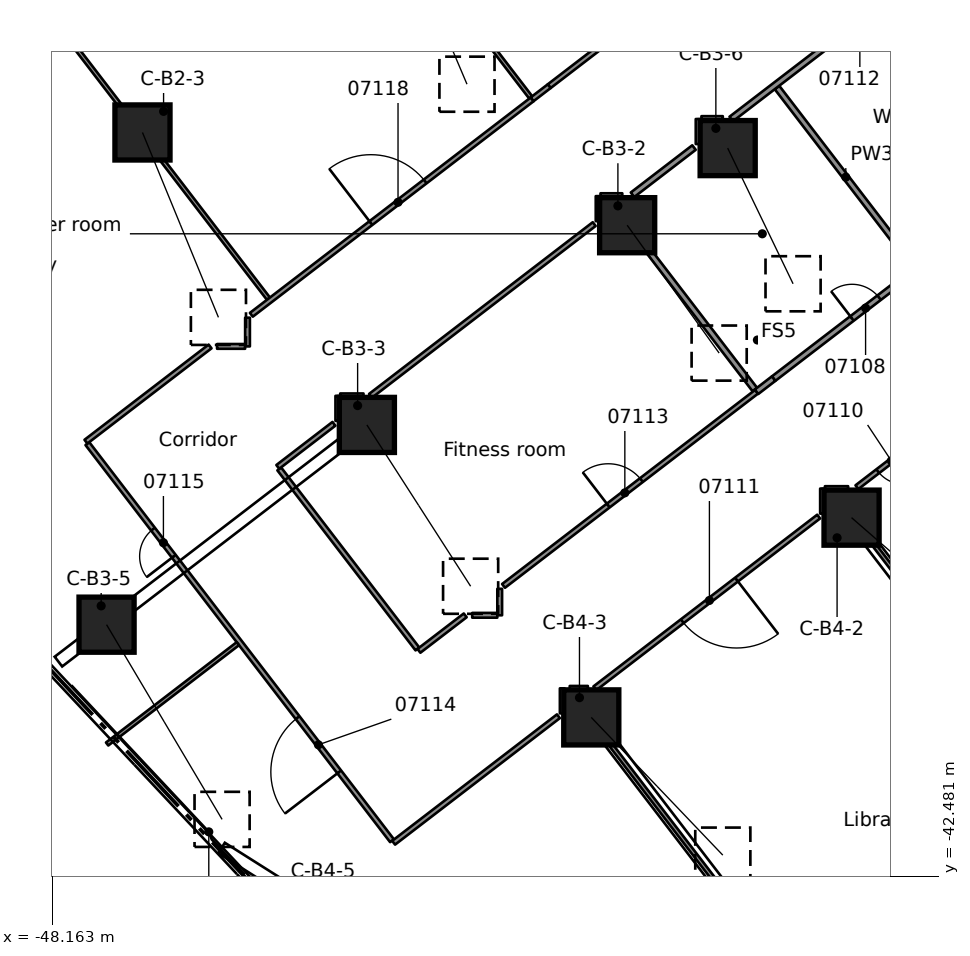
"""IFC4 building model, lengths in metres.
Left out: names, types, materials, properties, quantities, classifications, styles, units other than length and angle.
Written with IfcOpenShell. Run it as: python <this file> out.ifc"""

import sys

from ifc_helpers import new_model, si_unit, direction, frame, frame_2d, origin, origin_2d, place, context, subcontext, project, spatial, rectangle, extrude, element, fill, save


model = new_model("IFC4")
c1 = context("Model", 3, precision=1e-05, world=origin(), true_north=direction((0.0, 1.0)))
c2 = subcontext(c1, "Body", "Model", "MODEL_VIEW")
j1 = project(units=[si_unit("LENGTHUNIT", "METRE"), si_unit("PLANEANGLEUNIT", "RADIAN")], contexts=[c1])
p1 = place(None, origin())
s1 = spatial("IfcSite", under=j1, at=p1, CompositionType="ELEMENT")
p2 = place(p1, origin())
s2 = spatial("IfcBuilding", under=s1, at=p2, CompositionType="ELEMENT")
p3 = place(p2, frame((0.0, 0.0, 33.3)))
s3 = spatial("IfcBuildingStorey", under=s2, at=p3, CompositionType="ELEMENT", Elevation=33.3)
p4 = place(p3, frame((-38.935, -17.649, 0.61), z_axis=(0.328456976926, -0.774735201136, 0.540278985737), x_axis=(0.920675138709, 0.390329718267, 0.0)))
e1 = element("IfcColumn", 1, at=p4, inside=s3, PredefinedType="COLUMN", context=c2, shape_type="SweptSolid", body=[
    extrude(rectangle(XDim=1.45, YDim=1.45, at=origin_2d()), origin(), (0.0, 0.0, 1.0), 5.145),
])
p5 = place(p3, frame((-45.784, -22.905, 0.644), z_axis=(0.337825549268, -0.822160444585, 0.45817693266), x_axis=(0.924959508437, 0.380065662422, 0.0)))
e2 = element("IfcColumn", 2, at=p5, inside=s3, PredefinedType="COLUMN", context=c2, shape_type="SweptSolid", body=[
    extrude(rectangle(XDim=1.45, YDim=1.45, at=origin_2d()), origin(), (0.0, 0.0, 1.0), 5.917),
])
p6 = place(p3, frame((-33.03, -25.345, 0.601), z_axis=(0.484075605361, -0.672785526742, 0.559491236125), x_axis=(0.811723079597, 0.584042500208, 0.0)))
e3 = element("IfcColumn", 3, at=p6, inside=s3, PredefinedType="COLUMN", context=c2, shape_type="SweptSolid", body=[
    extrude(rectangle(XDim=1.45, YDim=1.45, at=origin_2d()), origin(), (0.0, 0.0, 1.0), 5.001),
])
p7 = place(p3, frame((-39.879, -30.6, 0.638), z_axis=(0.476003991751, -0.740143212715, 0.474982341259), x_axis=(0.841076298964, 0.540916499397, 0.0)))
e4 = element("IfcColumn", 4, at=p7, inside=s3, PredefinedType="COLUMN", context=c2, shape_type="SweptSolid", body=[
    extrude(rectangle(XDim=1.45, YDim=1.45, at=origin_2d()), origin(), (0.0, 0.0, 1.0), 5.735),
])
p8 = place(p3, frame((-46.729, -35.856, 0.661), z_axis=(0.465465031922, -0.78439754496, 0.409954626171), x_axis=(0.859985150882, 0.510319057319, 0.0)))
e5 = element("IfcColumn", 5, at=p8, inside=s3, PredefinedType="COLUMN", context=c2, shape_type="SweptSolid", body=[
    extrude(rectangle(XDim=1.45, YDim=1.45, at=origin_2d()), origin(), (0.0, 0.0, 1.0), 6.531),
])
p9 = place(p3, frame((-30.385, -23.316, 0.591), z_axis=(0.353875242444, -0.734106635021, 0.579534089768), x_axis=(0.90080181457, 0.434230458244, 0.0)))
e6 = element("IfcColumn", 6, at=p9, inside=s3, PredefinedType="COLUMN", context=c2, shape_type="SweptSolid", body=[
    extrude(rectangle(XDim=1.45, YDim=1.45, at=origin_2d()), origin(), (0.0, 0.0, 1.0), 4.863),
])
p10 = place(p3, frame((-27.125, -33.04, 0.603), z_axis=(0.626915434331, -0.545922874152, 0.555828439066), x_axis=(0.656712169931, 0.754141316906, 0.0)))
e7 = element("IfcColumn", 7, at=p10, inside=s3, PredefinedType="COLUMN", context=c2, shape_type="SweptSolid", body=[
    extrude(rectangle(XDim=1.45, YDim=1.45, at=origin_2d()), origin(), (0.0, 0.0, 1.0), 5.028),
])
p11 = place(p3, frame((-33.974, -38.296, 0.637), z_axis=(0.606713355896, -0.635258027433, 0.477855775689), x_axis=(0.723167492828, 0.690672699125, 0.0)))
e8 = element("IfcColumn", 8, at=p11, inside=s3, PredefinedType="COLUMN", context=c2, shape_type="SweptSolid", body=[
    extrude(rectangle(XDim=1.45, YDim=1.45, at=origin_2d()), origin(), (0.0, 0.0, 1.0), 5.705),
])
p12 = place(p3, frame((-39.218, -41.54, 0.0), z_axis=(0.0, 0.0, 1.0), x_axis=(-0.608705901591, 0.79339594489, 0.0)))
e9 = element("IfcWall", 9, at=p12, inside=s3, PredefinedType="PARTITIONING", context=c2, shape_type="SweptSolid", body=[
    extrude(rectangle(XDim=13.169, YDim=0.125, at=frame_2d((6.584, 0.0))), origin(), (0.0, 0.0, 1.0), 3.56),
])
p13 = place(p12, frame((2.281, 0.0, 0.0)))
e10 = element("IfcOpeningElement", 10, at=p13, cuts=e9, PredefinedType="OPENING", context=c2, shape_type="SweptSolid", body=[
    extrude(rectangle(XDim=1.8, YDim=2.1, at=frame_2d((0.9, 1.05))), frame((0.0, 0.073, 0.0), z_axis=(0.0, -1.0, 0.0), x_axis=(1.0, 0.0, 0.0)), (0.0, 0.0, 1.0), 0.145),
])
p14 = place(p12, frame((9.431, 0.0, 0.0)))
e11 = element("IfcOpeningElement", 11, at=p14, cuts=e9, PredefinedType="OPENING", context=c2, shape_type="SweptSolid", body=[
    extrude(rectangle(XDim=0.9, YDim=2.1, at=frame_2d((0.45, 1.05))), frame((0.0, 0.073, 0.0), z_axis=(0.0, -1.0, 0.0), x_axis=(1.0, 0.0, 0.0)), (0.0, 0.0, 1.0), 0.145),
])
p15 = place(p3, frame((-42.185, -31.757, 0.0), z_axis=(0.0, 0.0, 1.0), x_axis=(0.608799639809, -0.793324018651, 0.0)))
e12 = element("IfcWall", 12, at=p15, inside=s3, PredefinedType="PARTITIONING", context=c2, shape_type="SweptSolid", body=[
    extrude(rectangle(XDim=5.972, YDim=0.125, at=frame_2d((2.986, 0.0))), origin(), (0.0, 0.0, 1.0), 3.56),
])
p16 = place(p3, frame((-52.2, -14.599, 0.0), z_axis=(0.0, 0.0, 1.0), x_axis=(0.608803805545, -0.793320821833, 0.0)))
e13 = element("IfcWall", 13, at=p16, inside=s3, PredefinedType="PARTITIONING", context=c2, shape_type="SweptSolid", body=[
    extrude(rectangle(XDim=15.982, YDim=0.1, at=frame_2d((7.991, 0.0))), origin(), (0.0, 0.0, 1.0), 3.56),
])
p17 = place(p3, frame((-34.501, -37.664, 0.0), z_axis=(0.0, 0.0, 1.0), x_axis=(0.608768597096, -0.793347839973, 0.0)))
e14 = element("IfcWall", 14, at=p17, inside=s3, PredefinedType="PARTITIONING", context=c2, shape_type="SweptSolid", body=[
    extrude(rectangle(XDim=16.162, YDim=0.1, at=frame_2d((8.081, 0.0))), origin(), (0.0, 0.0, 1.0), 3.56),
])
p18 = place(p3, frame((-45.331, -9.259, 0.0), z_axis=(0.0, 0.0, 1.0), x_axis=(0.608773776811, -0.793343865337, 0.0)))
e15 = element("IfcWall", 15, at=p18, inside=s3, PredefinedType="PARTITIONING", context=c2, shape_type="SweptSolid", body=[
    extrude(rectangle(XDim=16.037, YDim=0.1, at=frame_2d((8.019, 0.0))), origin(), (0.0, 0.0, 1.0), 3.56),
])
p19 = place(p3, frame((-33.482, -24.701, 0.0), z_axis=(0.0, 0.0, 1.0), x_axis=(0.608730316576, -0.793377212731, 0.0)))
e16 = element("IfcWall", 16, at=p19, inside=s3, PredefinedType="PARTITIONING", context=c2, shape_type="SweptSolid", body=[
    extrude(rectangle(XDim=6.261, YDim=0.15, at=frame_2d((3.13, 0.0))), origin(), (0.0, 0.0, 1.0), 3.56),
])
p20 = place(p3, frame((-27.599, -32.368, 0.0), z_axis=(0.0, 0.0, 1.0), x_axis=(0.608787633684, -0.793333232049, 0.0)))
e17 = element("IfcWall", 17, at=p20, inside=s3, PredefinedType="PARTITIONING", context=c2, shape_type="SweptSolid", body=[
    extrude(rectangle(XDim=15.6, YDim=0.1, at=frame_2d((7.8, 0.0))), origin(), (0.0, 0.0, 1.0), 3.56),
])
p21 = place(p3, frame((-29.087, -21.722, 0.0), z_axis=(0.0, 0.0, 1.0), x_axis=(0.608744291625, -0.793366489975, 0.0)))
e18 = element("IfcWall", 18, at=p21, inside=s3, PredefinedType="PARTITIONING", context=c2, shape_type="SweptSolid", body=[
    extrude(rectangle(XDim=5.948, YDim=0.15, at=frame_2d((2.974, 0.0))), origin(), (0.0, 0.0, 1.0), 3.56),
])
p22 = place(p3, frame((-34.541, -37.531, 0.0), z_axis=(0.0, 0.0, 1.0), x_axis=(1.0, 0.0, 0.0)))
e19 = element("IfcWall", 19, at=p22, inside=s3, PredefinedType="PARTITIONING", context=c2, shape_type="SweptSolid", body=[
    extrude(rectangle(XDim=0.477, YDim=0.125, at=frame_2d((0.239, 0.0))), origin(), (0.0, 0.0, 1.0), 3.56),
])
p23 = place(p3, frame((-37.107, -35.609, 0.0), z_axis=(0.0, 0.0, 1.0), x_axis=(1.0, 0.0, 0.0)))
e20 = element("IfcWall", 20, at=p23, inside=s3, PredefinedType="PARTITIONING", context=c2, shape_type="SweptSolid", body=[
    extrude(rectangle(XDim=0.66, YDim=0.125, at=frame_2d((0.33, 0.0))), origin(), (0.0, 0.0, 1.0), 3.56),
])
p24 = place(p3, frame((-27.826, -32.275, 0.0), z_axis=(0.0, 0.0, 1.0), x_axis=(1.0, 0.0, 0.0)))
e21 = element("IfcWall", 21, at=p24, inside=s3, PredefinedType="PARTITIONING", context=c2, shape_type="SweptSolid", body=[
    extrude(rectangle(XDim=0.611, YDim=0.125, at=frame_2d((0.305, 0.0))), origin(), (0.0, 0.0, 1.0), 3.56),
])
p25 = place(p3, frame((-40.581, -29.835, 0.0), z_axis=(0.0, 0.0, 1.0), x_axis=(1.0, 0.0, 0.0)))
e22 = element("IfcWall", 22, at=p25, inside=s3, PredefinedType="PARTITIONING", context=c2, shape_type="SweptSolid", body=[
    extrude(rectangle(XDim=0.613, YDim=0.125, at=frame_2d((0.307, 0.0))), origin(), (0.0, 0.0, 1.0), 3.56),
])
p26 = place(p3, frame((-43.821, -28.534, 0.0), z_axis=(0.0, 0.0, 1.0), x_axis=(1.0, 0.0, 0.0)))
e23 = element("IfcWall", 23, at=p26, inside=s3, PredefinedType="PARTITIONING", context=c2, shape_type="SweptSolid", body=[
    extrude(rectangle(XDim=0.738, YDim=0.125, at=frame_2d((0.369, 0.0))), origin(), (0.0, 0.0, 1.0), 3.56),
])
p27 = place(p3, frame((-33.731, -24.58, 0.0), z_axis=(0.0, 0.0, 1.0), x_axis=(1.0, 0.0, 0.0)))
e24 = element("IfcWall", 24, at=p27, inside=s3, PredefinedType="PARTITIONING", context=c2, shape_type="SweptSolid", body=[
    extrude(rectangle(XDim=0.573, YDim=0.15, at=frame_2d((0.287, 0.0))), origin(), (0.0, 0.0, 1.0), 3.56),
])
p28 = place(p3, frame((-31.075, -22.551, 0.0), z_axis=(0.0, 0.0, 1.0), x_axis=(1.0, 0.0, 0.0)))
e25 = element("IfcWall", 25, at=p28, inside=s3, PredefinedType="PARTITIONING", context=c2, shape_type="SweptSolid", body=[
    extrude(rectangle(XDim=0.562, YDim=0.15, at=frame_2d((0.281, 0.0))), origin(), (0.0, 0.0, 1.0), 3.56),
])
p29 = place(p3, frame((-39.175, -41.594, 0.0), z_axis=(0.0, 0.0, 1.0), x_axis=(0.793282735045, 0.608853432511, 0.0)))
e26 = element("IfcWall", 26, at=p29, inside=s3, PredefinedType="PARTITIONING", context=c2, shape_type="SweptSolid", body=[
    extrude(rectangle(XDim=5.466, YDim=0.125, at=frame_2d((2.733, 0.0))), origin(), (0.0, 0.0, 1.0), 3.56),
])
p30 = place(p3, frame((-27.991, -33.012, 0.0), z_axis=(0.0, 0.0, 1.0), x_axis=(-0.793332599064, -0.608788458549, 0.0)))
e27 = element("IfcWall", 27, at=p30, inside=s3, PredefinedType="PARTITIONING", context=c2, shape_type="SweptSolid", body=[
    extrude(rectangle(XDim=7.423, YDim=0.125, at=frame_2d((3.711, 0.0))), origin(), (0.0, 0.0, 1.0), 3.56),
])
p31 = place(p30, frame((2.723, 0.0, 0.0)))
e28 = element("IfcOpeningElement", 28, at=p31, cuts=e27, PredefinedType="OPENING", context=c2, shape_type="SweptSolid", body=[
    extrude(rectangle(XDim=1.8, YDim=2.1, at=frame_2d((0.9, 1.05))), frame((0.0, 0.073, 0.0), z_axis=(0.0, -1.0, 0.0), x_axis=(1.0, 0.0, 0.0)), (0.0, 0.0, 1.0), 0.145),
])
p32 = place(p3, frame((-25.346, -30.982, 0.0), z_axis=(0.0, 0.0, 1.0), x_axis=(-0.79329604463, -0.608836090893, 0.0)))
e29 = element("IfcWall", 29, at=p32, inside=s3, PredefinedType="PARTITIONING", context=c2, shape_type="SweptSolid", body=[
    extrude(rectangle(XDim=2.065, YDim=0.125, at=frame_2d((1.032, 0.0))), origin(), (0.0, 0.0, 1.0), 3.56),
])
p33 = place(p32, frame((0.473, 0.0, 0.0)))
e30 = element("IfcOpeningElement", 30, at=p33, cuts=e29, PredefinedType="OPENING", context=c2, shape_type="SweptSolid", body=[
    extrude(rectangle(XDim=0.9, YDim=2.1, at=frame_2d((0.45, 1.05))), frame((0.0, 0.073, 0.0), z_axis=(0.0, -1.0, 0.0), x_axis=(1.0, 0.0, 0.0)), (0.0, 0.0, 1.0), 0.145),
])
p34 = place(p3, frame((-38.509, -36.545, 0.0), z_axis=(0.0, 0.0, 1.0), x_axis=(0.793598680467, 0.608441561994, 0.0)))
e31 = element("IfcWall", 31, at=p34, inside=s3, PredefinedType="PARTITIONING", context=c2, shape_type="SweptSolid", body=[
    extrude(rectangle(XDim=1.535, YDim=0.125, at=frame_2d((0.768, 0.0))), origin(), (0.0, 0.0, 1.0), 3.56),
])
p35 = place(p3, frame((-36.283, -34.836, 0.0), z_axis=(0.0, 0.0, 1.0), x_axis=(0.793406369961, 0.608692313165, 0.0)))
e32 = element("IfcWall", 32, at=p35, inside=s3, PredefinedType="PARTITIONING", context=c2, shape_type="SweptSolid", body=[
    extrude(rectangle(XDim=8.392, YDim=0.125, at=frame_2d((4.196, 0.0))), origin(), (0.0, 0.0, 1.0), 3.56),
])
p36 = place(p35, frame((3.473, 0.0, 0.0)))
e33 = element("IfcOpeningElement", 33, at=p36, cuts=e32, PredefinedType="OPENING", context=c2, shape_type="SweptSolid", body=[
    extrude(rectangle(XDim=1.1, YDim=2.1, at=frame_2d((0.55, 1.05))), frame((0.0, 0.073, 0.0), z_axis=(0.0, -1.0, 0.0), x_axis=(1.0, 0.0, 0.0)), (0.0, 0.0, 1.0), 0.145),
])
p37 = place(p3, frame((-29.176, -29.382, 0.0), z_axis=(0.0, 0.0, 1.0), x_axis=(0.793471421385, 0.608607511821, 0.0)))
e34 = element("IfcWall", 34, at=p37, inside=s3, PredefinedType="PARTITIONING", context=c2, shape_type="SweptSolid", body=[
    extrude(rectangle(XDim=9.32, YDim=0.15, at=frame_2d((4.66, 0.0))), origin(), (0.0, 0.0, 1.0), 3.56),
])
p38 = place(p37, frame((2.6, 0.0, 0.0)))
e35 = element("IfcOpeningElement", 35, at=p38, cuts=e34, PredefinedType="OPENING", context=c2, shape_type="SweptSolid", body=[
    extrude(rectangle(XDim=0.9, YDim=2.1, at=frame_2d((0.45, 1.05))), frame((0.0, 0.085, 0.0), z_axis=(0.0, -1.0, 0.0), x_axis=(1.0, 0.0, 0.0)), (0.0, 0.0, 1.0), 0.17),
])
p39 = place(p3, frame((-29.625, -29.727, 0.0), z_axis=(0.0, 0.0, 1.0), x_axis=(0.792960485916, 0.609273065035, 0.0)))
e36 = element("IfcWall", 36, at=p39, inside=s3, PredefinedType="PARTITIONING", context=c2, shape_type="SweptSolid", body=[
    extrude(rectangle(XDim=0.566, YDim=0.15, at=frame_2d((0.283, 0.0))), origin(), (0.0, 0.0, 1.0), 3.56),
])
p40 = place(p3, frame((-46.714, -38.996, 0.0), z_axis=(0.0, 0.0, 1.0), x_axis=(0.793309958448, 0.608817961157, 0.0)))
e37 = element("IfcWall", 37, at=p40, inside=s3, PredefinedType="PARTITIONING", context=c2, shape_type="SweptSolid", body=[
    extrude(rectangle(XDim=4.336, YDim=0.1, at=frame_2d((2.168, 0.0))), origin(), (0.0, 0.0, 1.0), 3.56),
])
p41 = place(p3, frame((-42.223, -31.705, 0.0), z_axis=(0.0, 0.0, 1.0), x_axis=(0.793135510501, 0.609045205204, 0.0)))
e38 = element("IfcWall", 38, at=p41, inside=s3, PredefinedType="PARTITIONING", context=c2, shape_type="SweptSolid", body=[
    extrude(rectangle(XDim=1.862, YDim=0.125, at=frame_2d((0.931, 0.0))), origin(), (0.0, 0.0, 1.0), 3.56),
])
p42 = place(p3, frame((-39.784, -29.835, 0.0), z_axis=(0.0, 0.0, 1.0), x_axis=(0.793235050969, 0.608915555652, 0.0)))
e39 = element("IfcWall", 39, at=p42, inside=s3, PredefinedType="PARTITIONING", context=c2, shape_type="SweptSolid", body=[
    extrude(rectangle(XDim=7.421, YDim=0.125, at=frame_2d((3.711, 0.0))), origin(), (0.0, 0.0, 1.0), 3.56),
])
p43 = place(p3, frame((-32.889, -24.544, 0.0), z_axis=(0.0, 0.0, 1.0), x_axis=(0.793242097783, 0.608906375648, 0.0)))
e40 = element("IfcWall", 40, at=p43, inside=s3, PredefinedType="PARTITIONING", context=c2, shape_type="SweptSolid", body=[
    extrude(rectangle(XDim=2.04, YDim=0.15, at=frame_2d((1.02, 0.0))), origin(), (0.0, 0.0, 1.0), 3.56),
])
p44 = place(p3, frame((-24.685, -18.25, 0.0), z_axis=(0.0, 0.0, 1.0), x_axis=(-0.793443961698, -0.608643310687, 0.0)))
e41 = element("IfcWall", 41, at=p44, inside=s3, PredefinedType="PARTITIONING", context=c2, shape_type="SweptSolid", body=[
    extrude(rectangle(XDim=7.067, YDim=0.15, at=frame_2d((3.533, 0.0))), origin(), (0.0, 0.0, 1.0), 3.56),
])
p45 = place(p44, frame((2.35, 0.0, 0.0)))
e42 = element("IfcOpeningElement", 42, at=p45, cuts=e41, PredefinedType="OPENING", context=c2, shape_type="SweptSolid", body=[
    extrude(rectangle(XDim=0.9, YDim=2.1, at=frame_2d((0.45, 1.05))), frame((0.0, 0.085, 0.0), z_axis=(0.0, -1.0, 0.0), x_axis=(1.0, 0.0, 0.0)), (0.0, 0.0, 1.0), 0.17),
])
p46 = place(p3, frame((-44.005, -28.535, 0.0), z_axis=(0.0, 0.0, 1.0), x_axis=(-0.793449826547, -0.608635665035, 0.0)))
e43 = element("IfcWall", 43, at=p46, inside=s3, PredefinedType="PARTITIONING", context=c2, shape_type="SweptSolid", body=[
    extrude(rectangle(XDim=4.118, YDim=0.125, at=frame_2d((2.059, 0.0))), origin(), (0.0, 0.0, 1.0), 3.56),
])
p47 = place(p3, frame((-42.919, -27.702, 0.0), z_axis=(0.0, 0.0, 1.0), x_axis=(0.793470923698, 0.60860816068, 0.0)))
e44 = element("IfcWall", 44, at=p47, inside=s3, PredefinedType="PARTITIONING", context=c2, shape_type="SweptSolid", body=[
    extrude(rectangle(XDim=9.315, YDim=0.125, at=frame_2d((4.657, 0.0))), origin(), (0.0, 0.0, 1.0), 3.56),
])
p48 = place(p47, frame((3.964, 0.0, 0.0)))
e45 = element("IfcOpeningElement", 45, at=p48, cuts=e44, PredefinedType="OPENING", context=c2, shape_type="SweptSolid", body=[
    extrude(rectangle(XDim=1.8, YDim=2.1, at=frame_2d((0.9, 1.05))), frame((0.0, 0.073, 0.0), z_axis=(0.0, -1.0, 0.0), x_axis=(1.0, 0.0, 0.0)), (0.0, 0.0, 1.0), 0.145),
])
p49 = place(p3, frame((-35.081, -21.687, 0.0), z_axis=(0.0, 0.0, 1.0), x_axis=(0.793358624224, 0.608754542792, 0.0)))
e46 = element("IfcWall", 46, at=p49, inside=s3, PredefinedType="PARTITIONING", context=c2, shape_type="SweptSolid", body=[
    extrude(rectangle(XDim=9.567, YDim=0.125, at=frame_2d((4.784, 0.0))), origin(), (0.0, 0.0, 1.0), 3.56),
])
p50 = place(p49, frame((6.334, 0.0, 0.0)))
e47 = element("IfcOpeningElement", 47, at=p50, cuts=e46, PredefinedType="OPENING", context=c2, shape_type="SweptSolid", body=[
    extrude(rectangle(XDim=1.8, YDim=2.1, at=frame_2d((0.9, 1.05))), frame((0.0, 0.073, 0.0), z_axis=(0.0, -1.0, 0.0), x_axis=(1.0, 0.0, 0.0)), (0.0, 0.0, 1.0), 0.145),
])
p51 = place(p49, frame((1.85, 0.0, 0.0)))
e48 = element("IfcOpeningElement", 48, at=p51, cuts=e46, PredefinedType="OPENING", context=c2, shape_type="SweptSolid", body=[
    extrude(rectangle(XDim=1.1, YDim=2.1, at=frame_2d((0.55, 1.05))), frame((0.0, 0.073, 0.0), z_axis=(0.0, -1.0, 0.0), x_axis=(1.0, 0.0, 0.0)), (0.0, 0.0, 1.0), 0.145),
])
p52 = place(p3, frame((-35.53, -22.032, 0.0), z_axis=(0.0, 0.0, 1.0), x_axis=(0.792960485916, 0.609273065035, 0.0)))
e49 = element("IfcWall", 49, at=p52, inside=s3, PredefinedType="PARTITIONING", context=c2, shape_type="SweptSolid", body=[
    extrude(rectangle(XDim=0.566, YDim=0.125, at=frame_2d((0.283, 0.0))), origin(), (0.0, 0.0, 1.0), 3.56),
])
p53 = place(p3, frame((-27.889, -32.934, 0.0), z_axis=(0.0, 0.0, 1.0), x_axis=(0.0, 1.0, 0.0)))
e50 = element("IfcWall", 50, at=p53, inside=s3, PredefinedType="PARTITIONING", context=c2, shape_type="SweptSolid", body=[
    extrude(rectangle(XDim=0.659, YDim=0.125, at=frame_2d((0.33, 0.0))), origin(), (0.0, 0.0, 1.0), 3.56),
])
p54 = place(p3, frame((-31.15, -23.209, 0.0), z_axis=(0.0, 0.0, 1.0), x_axis=(0.0, 1.0, 0.0)))
e51 = element("IfcWall", 51, at=p54, inside=s3, PredefinedType="PARTITIONING", context=c2, shape_type="SweptSolid", body=[
    extrude(rectangle(XDim=0.658, YDim=0.15, at=frame_2d((0.329, 0.0))), origin(), (0.0, 0.0, 1.0), 3.56),
])
for number, where, z_axis, x_axis in (
    (52, (-33.794, -25.239, 0.0), (0.0, 0.0, 1.0), (0.0, 1.0, 0.0)),
    (53, (-34.738, -38.19, 0.0), (0.0, 0.0, 1.0), (0.0, 1.0, 0.0)),
):
    element("IfcWall", number, at=place(p3, frame(where, z_axis=z_axis, x_axis=x_axis)), inside=s3, PredefinedType="PARTITIONING", context=c2, shape_type="SweptSolid", body=[
        extrude(rectangle(XDim=0.659, YDim=0.125, at=frame_2d((0.33, 0.0))), origin(), (0.0, 0.0, 1.0), 3.56),
    ])
p55 = place(p3, frame((-36.384, -35.609, 0.0), z_axis=(0.0, 0.0, 1.0), x_axis=(0.0, 1.0, 0.0)))
e54 = element("IfcWall", 54, at=p55, inside=s3, PredefinedType="PARTITIONING", context=c2, shape_type="SweptSolid", body=[
    extrude(rectangle(XDim=0.696, YDim=0.125, at=frame_2d((0.348, 0.0))), origin(), (0.0, 0.0, 1.0), 3.56),
])
p56 = place(p3, frame((-40.643, -30.494, 0.0), z_axis=(0.0, 0.0, 1.0), x_axis=(0.0, 1.0, 0.0)))
e55 = element("IfcWall", 55, at=p56, inside=s3, PredefinedType="PARTITIONING", context=c2, shape_type="SweptSolid", body=[
    extrude(rectangle(XDim=0.659, YDim=0.125, at=frame_2d((0.33, 0.0))), origin(), (0.0, 0.0, 1.0), 3.56),
])
p57 = place(p3, frame((-43.02, -28.534, 0.0), z_axis=(0.0, 0.0, 1.0), x_axis=(0.0, 1.0, 0.0)))
e56 = element("IfcWall", 56, at=p57, inside=s3, PredefinedType="PARTITIONING", context=c2, shape_type="SweptSolid", body=[
    extrude(rectangle(XDim=0.755, YDim=0.125, at=frame_2d((0.377, 0.0))), origin(), (0.0, 0.0, 1.0), 3.56),
])
p58 = place(p38, origin())
e57 = element("IfcDoor", 57, at=p58, inside=s3, OperationType="SINGLE_SWING_LEFT", PredefinedType="DOOR", context=c2, shape_type="SweptSolid", body=[
    extrude(rectangle(XDim=0.9, YDim=2.1, at=frame_2d((0.45, 1.05))), frame((0.0, 0.025, 0.0), z_axis=(0.0, -1.0, 0.0), x_axis=(1.0, 0.0, 0.0)), (0.0, 0.0, 1.0), 0.05),
])
fill(e35, e57)
p59 = place(p33, origin())
e58 = element("IfcDoor", 58, at=p59, inside=s3, OperationType="SINGLE_SWING_LEFT", PredefinedType="DOOR", context=c2, shape_type="SweptSolid", body=[
    extrude(rectangle(XDim=0.9, YDim=2.1, at=frame_2d((0.45, 1.05))), frame((0.0, 0.025, 0.0), z_axis=(0.0, -1.0, 0.0), x_axis=(1.0, 0.0, 0.0)), (0.0, 0.0, 1.0), 0.05),
])
fill(e30, e58)
p60 = place(p31, origin())
e59 = element("IfcDoor", 59, at=p60, inside=s3, OperationType="DOUBLE_DOOR_SINGLE_SWING", PredefinedType="DOOR", context=c2, shape_type="SweptSolid", body=[
    extrude(rectangle(XDim=1.8, YDim=2.1, at=frame_2d((0.9, 1.05))), frame((0.0, 0.025, 0.0), z_axis=(0.0, -1.0, 0.0), x_axis=(1.0, 0.0, 0.0)), (0.0, 0.0, 1.0), 0.05),
])
fill(e28, e59)
p61 = place(p36, origin())
e60 = element("IfcDoor", 60, at=p61, inside=s3, OperationType="SINGLE_SWING_LEFT", PredefinedType="DOOR", context=c2, shape_type="SweptSolid", body=[
    extrude(rectangle(XDim=1.1, YDim=2.1, at=frame_2d((0.55, 1.05))), frame((0.0, 0.025, 0.0), z_axis=(0.0, -1.0, 0.0), x_axis=(1.0, 0.0, 0.0)), (0.0, 0.0, 1.0), 0.05),
])
fill(e33, e60)
p62 = place(p13, origin())
e61 = element("IfcDoor", 61, at=p62, inside=s3, OperationType="DOUBLE_DOOR_SINGLE_SWING", PredefinedType="DOOR", context=c2, shape_type="SweptSolid", body=[
    extrude(rectangle(XDim=1.8, YDim=2.1, at=frame_2d((0.9, 1.05))), frame((0.0, 0.025, 0.0), z_axis=(0.0, -1.0, 0.0), x_axis=(1.0, 0.0, 0.0)), (0.0, 0.0, 1.0), 0.05),
])
fill(e10, e61)
p63 = place(p14, origin())
e62 = element("IfcDoor", 62, at=p63, inside=s3, OperationType="SINGLE_SWING_RIGHT", PredefinedType="DOOR", context=c2, shape_type="SweptSolid", body=[
    extrude(rectangle(XDim=0.9, YDim=2.1, at=frame_2d((0.45, 1.05))), frame((0.0, 0.025, 0.0), z_axis=(0.0, -1.0, 0.0), x_axis=(1.0, 0.0, 0.0)), (0.0, 0.0, 1.0), 0.05),
])
fill(e11, e62)
p64 = place(p48, origin())
e63 = element("IfcDoor", 63, at=p64, inside=s3, OperationType="DOUBLE_DOOR_SINGLE_SWING", PredefinedType="DOOR", context=c2, shape_type="SweptSolid", body=[
    extrude(rectangle(XDim=1.8, YDim=2.1, at=frame_2d((0.9, 1.05))), frame((0.0, 0.025, 0.0), z_axis=(0.0, -1.0, 0.0), x_axis=(1.0, 0.0, 0.0)), (0.0, 0.0, 1.0), 0.05),
])
fill(e45, e63)
save(model, sys.argv[1])
